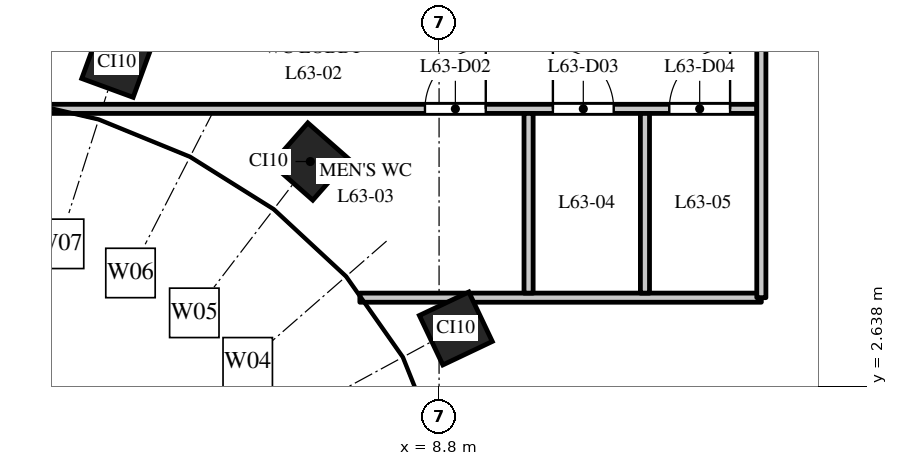
"""IFC4 building model, lengths in metres.
Left out: names, types, materials, properties, quantities, classifications, styles, units other than length and angle.
Written with IfcOpenShell. Run it as: python <this file> out.ifc"""

import sys

from ifc_helpers import new_model, si_unit, direction, frame, frame_2d, origin, origin_2d, place, context, subcontext, project, spatial, rectangle, extrude, element, fill, save


model = new_model("IFC4")
c1 = context("Model", 3, precision=1e-05, world=origin(), true_north=direction((0.0, 1.0)))
c2 = subcontext(c1, "Body", "Model", "MODEL_VIEW")
j1 = project(units=[si_unit("LENGTHUNIT", "METRE"), si_unit("PLANEANGLEUNIT", "RADIAN")], contexts=[c1])
p1 = place(None, origin())
s1 = spatial("IfcSite", under=j1, at=p1, CompositionType="ELEMENT")
p2 = place(p1, origin())
s2 = spatial("IfcBuilding", under=s1, at=p2, CompositionType="ELEMENT")
p3 = place(p2, frame((0.0, 0.0, 295.0)))
s3 = spatial("IfcBuildingStorey", under=s2, at=p3, CompositionType="ELEMENT", Elevation=295.0)
for number, where, z_axis, x_axis in (
    (1, (9.076, 3.588, 0.0), (0.0, 0.0, 1.0), (-0.429, 0.903, 0.0)),
    (2, (6.682, 6.334, 0.0), (0.0, 0.0, 1.0), (-0.751, 0.66, 0.0)),
    (3, (3.501, 7.967, 0.0), (0.0, 0.0, 1.0), (-0.939, 0.344, 0.0)),
):
    element("IfcColumn", number, at=place(p3, frame(where, z_axis=z_axis, x_axis=x_axis)), inside=s3, PredefinedType="COLUMN", context=c2, shape_type="SweptSolid", body=[
        extrude(rectangle(XDim=0.9, YDim=0.9, at=origin_2d()), origin(), (0.0, 0.0, 1.0), 4.0),
    ])
p4 = place(p3, frame((2.364, 7.2, 0.0), z_axis=(0.0, 0.0, 1.0), x_axis=(1.0, 0.0, 0.0)))
e4 = element("IfcWall", 4, at=p4, inside=s3, PredefinedType="PARTITIONING", context=c2, shape_type="SweptSolid", body=[
    extrude(rectangle(XDim=11.661, YDim=0.15, at=frame_2d((5.831, 0.0))), origin(), (0.0, 0.0, 1.0), 2.75),
])
p5 = place(p4, frame((6.204, 0.0, 0.0)))
e5 = element("IfcOpeningElement", 5, at=p5, cuts=e4, PredefinedType="OPENING", context=c2, shape_type="SweptSolid", body=[
    extrude(rectangle(XDim=1.0, YDim=2.1, at=frame_2d((0.5, 1.05))), frame((0.0, 0.085, 0.0), z_axis=(0.0, -1.0, 0.0), x_axis=(1.0, 0.0, 0.0)), (0.0, 0.0, 1.0), 0.17),
])
p6 = place(p4, frame((8.308, 0.0, 0.0)))
e6 = element("IfcOpeningElement", 6, at=p6, cuts=e4, PredefinedType="OPENING", context=c2, shape_type="SweptSolid", body=[
    extrude(rectangle(XDim=1.0, YDim=2.1, at=frame_2d((0.5, 1.05))), frame((0.0, 0.085, 0.0), z_axis=(0.0, -1.0, 0.0), x_axis=(1.0, 0.0, 0.0)), (0.0, 0.0, 1.0), 0.17),
])
p7 = place(p4, frame((10.222, 0.0, 0.0)))
e7 = element("IfcOpeningElement", 7, at=p7, cuts=e4, PredefinedType="OPENING", context=c2, shape_type="SweptSolid", body=[
    extrude(rectangle(XDim=1.0, YDim=2.1, at=frame_2d((0.5, 1.05))), frame((0.0, 0.085, 0.0), z_axis=(0.0, -1.0, 0.0), x_axis=(1.0, 0.0, 0.0)), (0.0, 0.0, 1.0), 0.17),
])
p8 = place(p3, frame((7.497, 4.095, 0.0), z_axis=(0.0, 0.0, 1.0), x_axis=(1.0, 0.0, 0.0)))
e8 = element("IfcWall", 8, at=p8, inside=s3, PredefinedType="PARTITIONING", context=c2, shape_type="SweptSolid", body=[
    extrude(rectangle(XDim=6.603, YDim=0.15, at=frame_2d((3.302, 0.0))), origin(), (0.0, 0.0, 1.0), 3.0),
])
for number, where, z_axis, x_axis in (
    (9, (10.272, 4.17, 0.0), (0.0, 0.0, 1.0), (0.0, 1.0, 0.0)),
    (10, (12.186, 4.17, 0.0), (0.0, 0.0, 1.0), (0.0, 1.0, 0.0)),
):
    element("IfcWall", number, at=place(p3, frame(where, z_axis=z_axis, x_axis=x_axis)), inside=s3, PredefinedType="PARTITIONING", context=c2, shape_type="SweptSolid", body=[
        extrude(rectangle(XDim=2.955, YDim=0.15, at=frame_2d((1.478, 0.0))), origin(), (0.0, 0.0, 1.0), 2.75),
    ])
p9 = place(p3, frame((14.1, 4.095, 0.0), z_axis=(0.0, 0.0, 1.0), x_axis=(0.0, 1.0, 0.0)))
e11 = element("IfcWall", 11, at=p9, inside=s3, PredefinedType="PARTITIONING", context=c2, shape_type="SweptSolid", body=[
    extrude(rectangle(XDim=5.005, YDim=0.15, at=frame_2d((2.502, 0.0))), origin(), (0.0, 0.0, 1.0), 2.75),
])
p10 = place(p5, origin())
e12 = element("IfcDoor", 12, at=p10, inside=s3, OperationType="SINGLE_SWING_RIGHT", PredefinedType="DOOR", context=c2, shape_type="SweptSolid", body=[
    extrude(rectangle(XDim=1.0, YDim=2.1, at=frame_2d((0.5, 1.05))), frame((0.0, 0.025, 0.0), z_axis=(0.0, -1.0, 0.0), x_axis=(1.0, 0.0, 0.0)), (0.0, 0.0, 1.0), 0.05),
])
fill(e5, e12)
p11 = place(p6, origin())
e13 = element("IfcDoor", 13, at=p11, inside=s3, OperationType="SINGLE_SWING_LEFT", PredefinedType="DOOR", context=c2, shape_type="SweptSolid", body=[
    extrude(rectangle(XDim=1.0, YDim=2.1, at=frame_2d((0.5, 1.05))), frame((0.0, 0.025, 0.0), z_axis=(0.0, -1.0, 0.0), x_axis=(1.0, 0.0, 0.0)), (0.0, 0.0, 1.0), 0.05),
])
fill(e6, e13)
p12 = place(p7, origin())
e14 = element("IfcDoor", 14, at=p12, inside=s3, OperationType="SINGLE_SWING_RIGHT", PredefinedType="DOOR", context=c2, shape_type="SweptSolid", body=[
    extrude(rectangle(XDim=1.0, YDim=2.1, at=frame_2d((0.5, 1.05))), frame((0.0, 0.025, 0.0), z_axis=(0.0, -1.0, 0.0), x_axis=(1.0, 0.0, 0.0)), (0.0, 0.0, 1.0), 0.05),
])
fill(e7, e14)
save(model, sys.argv[1])
